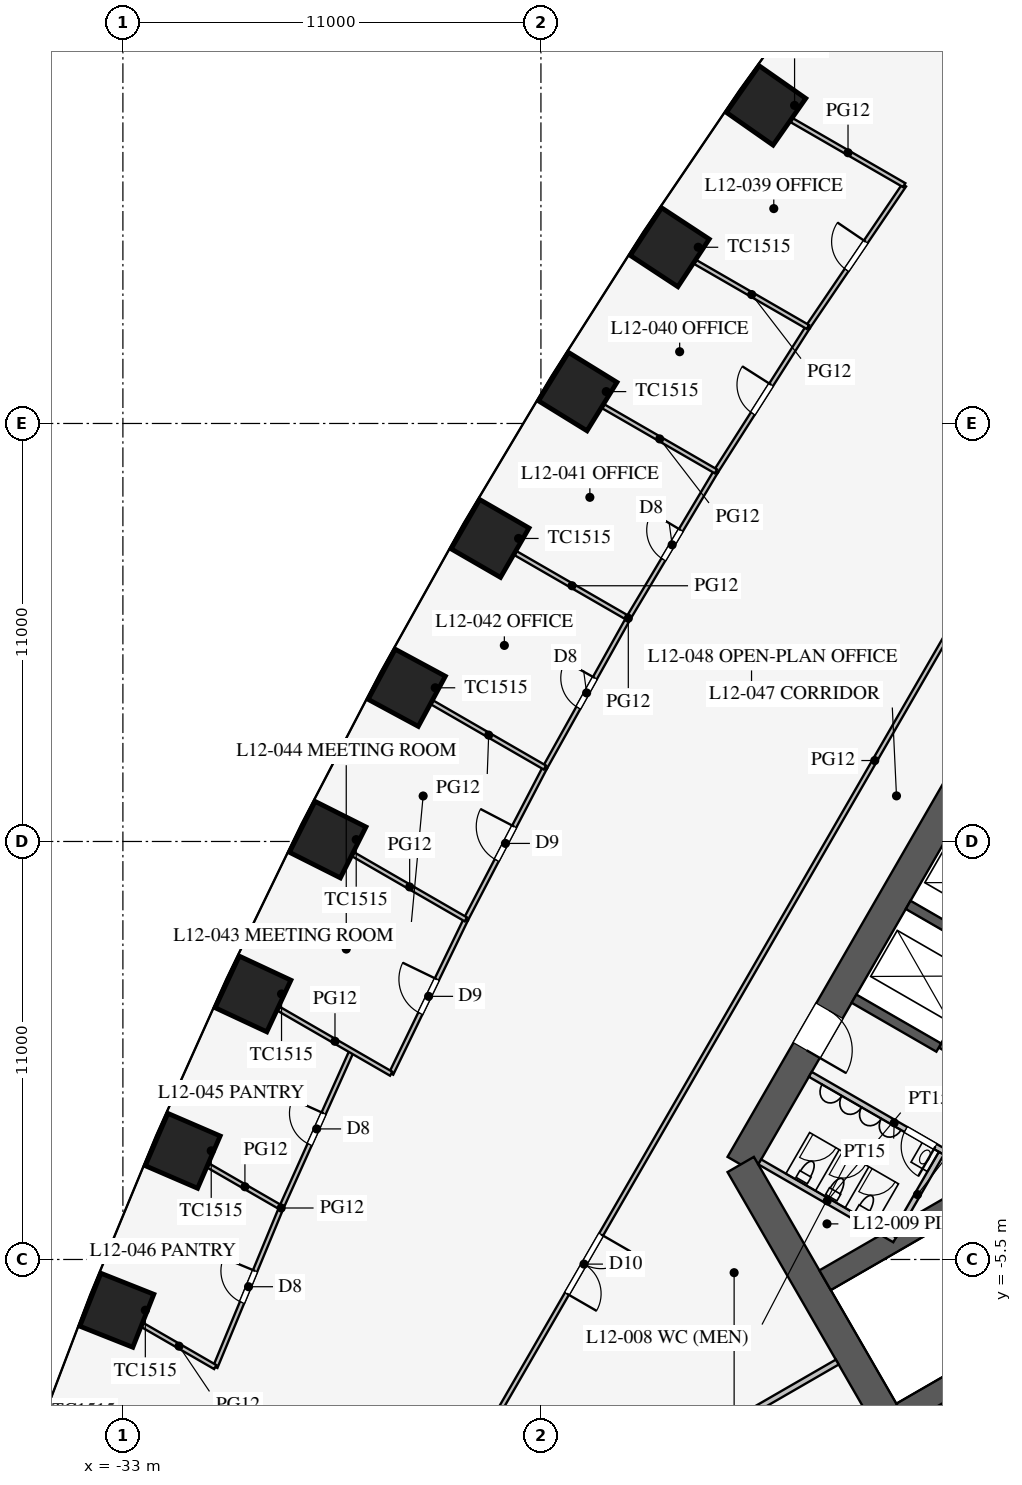
"""IFC4 building model, lengths in metres.
Left out: names, types, materials, properties, quantities, classifications, styles, units other than length and angle.
Written with IfcOpenShell. Run it as: python <this file> out.ifc"""

import sys

from ifc_helpers import new_model, si_unit, direction, frame, frame_2d, origin, origin_2d, place, context, subcontext, project, spatial, rectangle, extrude, element, fill, save


model = new_model("IFC4")
c1 = context("Model", 3, precision=1e-05, world=origin(), true_north=direction((0.0, 1.0)))
c2 = subcontext(c1, "Body", "Model", "MODEL_VIEW")
j1 = project(units=[si_unit("LENGTHUNIT", "METRE"), si_unit("PLANEANGLEUNIT", "RADIAN")], contexts=[c1])
p1 = place(None, origin())
s1 = spatial("IfcSite", under=j1, at=p1, CompositionType="ELEMENT")
p2 = place(p1, origin())
s2 = spatial("IfcBuilding", under=s1, at=p2, CompositionType="ELEMENT")
p3 = place(p2, frame((0.0, 0.0, 54.3)))
s3 = spatial("IfcBuildingStorey", under=s2, at=p3, CompositionType="ELEMENT", Elevation=54.3)
for number, where, z_axis, x_axis in (
    (1, (-16.076, 24.87, 0.0), (0.0, 0.0, 1.0), (-0.574, -0.819, 0.0)),
    (2, (-18.611, 21.137, 0.0), (0.0, 0.0, 1.0), (-0.549, -0.836, 0.0)),
    (3, (-21.031, 17.339, 0.0), (0.0, 0.0, 1.0), (-0.525, -0.851, 0.0)),
    (4, (-23.338, 13.474, 0.0), (0.0, 0.0, 1.0), (-0.5, -0.866, 0.0)),
    (5, (-25.531, 9.544, 0.0), (0.0, 0.0, 1.0), (-0.475, -0.88, 0.0)),
    (6, (-27.611, 5.549, 0.0), (0.0, 0.0, 1.0), (-0.449, -0.894, 0.0)),
    (7, (-29.576, 1.487, 0.0), (0.0, 0.0, 1.0), (-0.423, -0.906, 0.0)),
    (8, (-31.426, -2.641, 0.0), (0.0, 0.0, 1.0), (-0.396, -0.918, 0.0)),
    (9, (-33.16, -6.836, 0.0), (0.0, 0.0, 1.0), (-0.369, -0.929, 0.0)),
):
    element("IfcColumn", number, at=place(p3, frame(where, z_axis=z_axis, x_axis=x_axis)), inside=s3, PredefinedType="COLUMN", context=c2, shape_type="SweptSolid", body=[
        extrude(rectangle(XDim=1.5, YDim=1.5, at=origin_2d()), origin(), (0.0, 0.0, 1.0), 4.2),
    ])
p4 = place(p3, frame((-5.773, 16.0, 0.0), z_axis=(0.0, 0.0, 1.0), x_axis=(-0.500002442456, -0.866023993627, 0.0)))
e10 = element("IfcWall", 10, at=p4, inside=s3, PredefinedType="SHEAR", context=c2, shape_type="SweptSolid", body=[
    extrude(rectangle(XDim=21.939, YDim=0.8, at=frame_2d((10.97, 0.0))), origin(), (0.0, 0.0, 1.0), 4.2),
])
p5 = place(p4, frame((17.27, 0.0, 0.0)))
e11 = element("IfcOpeningElement", 11, at=p5, cuts=e10, PredefinedType="OPENING", context=c2, shape_type="SweptSolid", body=[
    extrude(rectangle(XDim=1.2, YDim=2.1, at=frame_2d((0.6, 1.05))), frame((0.0, 0.41, 0.0), z_axis=(0.0, -1.0, 0.0), x_axis=(1.0, 0.0, 0.0)), (0.0, 0.0, 1.0), 0.82),
])
p6 = place(p4, frame((3.47, 0.0, 0.0)))
e12 = element("IfcOpeningElement", 12, at=p6, cuts=e10, PredefinedType="OPENING", context=c2, shape_type="SweptSolid", body=[
    extrude(rectangle(XDim=1.2, YDim=2.1, at=frame_2d((0.6, 1.05))), frame((0.0, 0.41, 0.0), z_axis=(0.0, -1.0, 0.0), x_axis=(1.0, 0.0, 0.0)), (0.0, 0.0, 1.0), 0.82),
])
p7 = place(p3, frame((-16.743, -3.0, 0.0), z_axis=(0.0, 0.0, 1.0), x_axis=(0.499995765644, -0.866027848477, 0.0)))
e13 = element("IfcWall", 13, at=p7, inside=s3, PredefinedType="SHEAR", context=c2, shape_type="SweptSolid", body=[
    extrude(rectangle(XDim=11.547, YDim=0.8, at=frame_2d((5.773, 0.0))), origin(), (0.0, 0.0, 1.0), 4.2),
])
p8 = place(p3, frame((-5.724, 9.886, 0.0), z_axis=(0.0, 0.0, 1.0), x_axis=(-0.500001763848, -0.866024385424, 0.0)))
e14 = element("IfcWall", 14, at=p8, inside=s3, PredefinedType="SHEAR", context=c2, shape_type="SweptSolid", body=[
    extrude(rectangle(XDim=11.4, YDim=0.25, at=frame_2d((5.7, 0.0))), origin(), (0.0, 0.0, 1.0), 4.2),
])
p9 = place(p8, frame((6.525, 0.0, 0.0)))
e15 = element("IfcOpeningElement", 15, at=p9, cuts=e14, PredefinedType="OPENING", context=c2, shape_type="SweptSolid", body=[
    extrude(rectangle(XDim=1.2, YDim=2.2, at=frame_2d((0.6, 1.1))), frame((0.0, 0.135, 0.0), z_axis=(0.0, -1.0, 0.0), x_axis=(1.0, 0.0, 0.0)), (0.0, 0.0, 1.0), 0.27),
])
p10 = place(p8, frame((9.375, 0.0, 0.0)))
e16 = element("IfcOpeningElement", 16, at=p10, cuts=e14, PredefinedType="OPENING", context=c2, shape_type="SweptSolid", body=[
    extrude(rectangle(XDim=1.2, YDim=2.2, at=frame_2d((0.6, 1.1))), frame((0.0, 0.135, 0.0), z_axis=(0.0, -1.0, 0.0), x_axis=(1.0, 0.0, 0.0)), (0.0, 0.0, 1.0), 0.27),
])
for number, where, z_axis, x_axis in (
    (17, (-10.107, 2.544, 0.0), (0.0, 0.0, 1.0), (-0.866, 0.5, 0.0)),
    (18, (-11.532, 0.076, 0.0), (0.0, 0.0, 1.0), (-0.866, 0.5, 0.0)),
):
    element("IfcWall", number, at=place(p3, frame(where, z_axis=z_axis, x_axis=x_axis)), inside=s3, PredefinedType="SHEAR", context=c2, shape_type="SweptSolid", body=[
        extrude(rectangle(XDim=2.575, YDim=0.25, at=frame_2d((1.288, 0.0))), origin(), (0.0, 0.0, 1.0), 4.2),
    ])
for number, where, z_axis, x_axis in (
    (19, (-6.663, -1.509, 0.0), (0.0, 0.0, 1.0), (-0.866, -0.5, 0.0)),
    (20, (-4.638, -5.016, 0.0), (0.0, 0.0, 1.0), (-0.866, -0.5, 0.0)),
):
    element("IfcWall", number, at=place(p3, frame(where, z_axis=z_axis, x_axis=x_axis)), inside=s3, PredefinedType="SHEAR", context=c2, shape_type="SweptSolid", body=[
        extrude(rectangle(XDim=9.075, YDim=0.6, at=frame_2d((4.538, 0.0))), origin(), (0.0, 0.0, 1.0), 4.2),
    ])
p11 = place(p3, frame((-10.495, -3.178, 0.0), z_axis=(0.0, 0.0, 1.0), x_axis=(-0.86602216432, 0.500005610874, 0.0)))
e21 = element("IfcWall", 21, at=p11, inside=s3, PredefinedType="PARTITIONING", context=c2, shape_type="SweptSolid", body=[
    extrude(rectangle(XDim=5.1, YDim=0.15, at=frame_2d((2.55, 0.0))), origin(), (0.0, 0.0, 1.0), 4.0),
])
p12 = place(p11, frame((1.3, 0.0, 0.0)))
e22 = element("IfcOpeningElement", 22, at=p12, cuts=e21, PredefinedType="OPENING", context=c2, shape_type="SweptSolid", body=[
    extrude(rectangle(XDim=0.9, YDim=2.1, at=frame_2d((0.45, 1.05))), frame((0.0, 0.085, 0.0), z_axis=(0.0, -1.0, 0.0), x_axis=(1.0, 0.0, 0.0)), (0.0, 0.0, 1.0), 0.17),
])
p13 = place(p3, frame((-12.691, -4.982, 0.0), z_axis=(0.0, 0.0, 1.0), x_axis=(-0.8660249478, 0.500000789788, 0.0)))
e23 = element("IfcWall", 23, at=p13, inside=s3, PredefinedType="PARTITIONING", context=c2, shape_type="SweptSolid", body=[
    extrude(rectangle(XDim=4.1, YDim=0.15, at=frame_2d((2.05, 0.0))), origin(), (0.0, 0.0, 1.0), 4.0),
])
p14 = place(p3, frame((-11.464, -2.706, 0.0), z_axis=(0.0, 0.0, 1.0), x_axis=(-0.50001992892, -0.866013897511, 0.0)))
e24 = element("IfcWall", 24, at=p14, inside=s3, PredefinedType="PARTITIONING", context=c2, shape_type="SweptSolid", body=[
    extrude(rectangle(XDim=2.51, YDim=0.15, at=frame_2d((1.255, 0.0))), origin(), (0.0, 0.0, 1.0), 4.0),
])
p15 = place(p3, frame((-14.203, -8.2, 0.0), z_axis=(0.0, 0.0, 1.0), x_axis=(-0.866024965723, -0.500000758745, 0.0)))
e25 = element("IfcWall", 25, at=p15, inside=s3, PredefinedType="PARTITIONING", context=c2, shape_type="SweptSolid", body=[
    extrude(rectangle(XDim=18.25, YDim=0.15, at=frame_2d((9.125, 0.0))), origin(), (0.0, 0.0, 1.0), 2.3),
])
p16 = place(p3, frame((-0.016, 30.491, 0.0), z_axis=(0.0, 0.0, 1.0), x_axis=(-0.50000091641, -0.866024874695, 0.0)))
e26 = element("IfcWall", 26, at=p16, inside=s3, PredefinedType="PARTITIONING", context=c2, shape_type="SweptSolid", body=[
    extrude(rectangle(XDim=52.796, YDim=0.12, at=frame_2d((26.398, 0.0))), origin(), (0.0, 0.0, 1.0), 2.9),
])
p17 = place(p16, frame((10.2, 0.0, 0.15)))
e27 = element("IfcOpeningElement", 27, at=p17, cuts=e26, PredefinedType="OPENING", context=c2, shape_type="SweptSolid", body=[
    extrude(rectangle(XDim=1.8, YDim=2.1, at=frame_2d((0.9, 1.05))), frame((0.0, 0.07, 0.0), z_axis=(0.0, -1.0, 0.0), x_axis=(1.0, 0.0, 0.0)), (0.0, 0.0, 1.0), 0.14),
])
p18 = place(p16, frame((40.8, 0.0, 0.15)))
e28 = element("IfcOpeningElement", 28, at=p18, cuts=e26, PredefinedType="OPENING", context=c2, shape_type="SweptSolid", body=[
    extrude(rectangle(XDim=1.8, YDim=2.1, at=frame_2d((0.9, 1.05))), frame((0.0, 0.07, 0.0), z_axis=(0.0, -1.0, 0.0), x_axis=(1.0, 0.0, 0.0)), (0.0, 0.0, 1.0), 0.14),
])
p19 = place(p3, frame((-19.701, 11.374, 0.0), z_axis=(0.0, 0.0, 1.0), x_axis=(-0.487415216275, -0.87317031955, 0.0)))
e29 = element("IfcWall", 29, at=p19, inside=s3, PredefinedType="PARTITIONING", context=c2, shape_type="SweptSolid", body=[
    extrude(rectangle(XDim=4.5, YDim=0.12, at=frame_2d((2.25, 0.0))), origin(), (0.0, 0.0, 1.0), 2.9),
])
p20 = place(p19, frame((1.8, 0.0, 0.15)))
e30 = element("IfcOpeningElement", 30, at=p20, cuts=e29, PredefinedType="OPENING", context=c2, shape_type="SweptSolid", body=[
    extrude(rectangle(XDim=0.9, YDim=2.1, at=frame_2d((0.45, 1.05))), frame((0.0, 0.07, 0.0), z_axis=(0.0, -1.0, 0.0), x_axis=(1.0, 0.0, 0.0)), (0.0, 0.0, 1.0), 0.14),
])
p21 = place(p3, frame((-26.98, -0.011, 0.0), z_axis=(0.0, 0.0, 1.0), x_axis=(-0.409430894151, -0.912341132973, 0.0)))
e31 = element("IfcWall", 31, at=p21, inside=s3, PredefinedType="PARTITIONING", context=c2, shape_type="SweptSolid", body=[
    extrude(rectangle(XDim=4.523, YDim=0.12, at=frame_2d((2.262, 0.0))), origin(), (0.0, 0.0, 1.0), 2.9),
])
p22 = place(p21, frame((1.8, 0.0, 0.15)))
e32 = element("IfcOpeningElement", 32, at=p22, cuts=e31, PredefinedType="OPENING", context=c2, shape_type="SweptSolid", body=[
    extrude(rectangle(XDim=0.9, YDim=2.1, at=frame_2d((0.45, 1.05))), frame((0.0, 0.07, 0.0), z_axis=(0.0, -1.0, 0.0), x_axis=(1.0, 0.0, 0.0)), (0.0, 0.0, 1.0), 0.14),
])
p23 = place(p3, frame((-28.833, -4.138, 0.0), z_axis=(0.0, 0.0, 1.0), x_axis=(-0.38265900014, -0.923889652292, 0.0)))
e33 = element("IfcWall", 33, at=p23, inside=s3, PredefinedType="PARTITIONING", context=c2, shape_type="SweptSolid", body=[
    extrude(rectangle(XDim=4.539, YDim=0.12, at=frame_2d((2.27, 0.0))), origin(), (0.0, 0.0, 1.0), 2.9),
])
p24 = place(p23, frame((1.8, 0.0, 0.15)))
e34 = element("IfcOpeningElement", 34, at=p24, cuts=e33, PredefinedType="OPENING", context=c2, shape_type="SweptSolid", body=[
    extrude(rectangle(XDim=0.9, YDim=2.1, at=frame_2d((0.45, 1.05))), frame((0.0, 0.07, 0.0), z_axis=(0.0, -1.0, 0.0), x_axis=(1.0, 0.0, 0.0)), (0.0, 0.0, 1.0), 0.14),
])
p25 = place(p3, frame((-21.895, 7.445, 0.0), z_axis=(0.0, 0.0, 1.0), x_axis=(-0.461810056307, -0.886978845235, 0.0)))
e35 = element("IfcWall", 35, at=p25, inside=s3, PredefinedType="PARTITIONING", context=c2, shape_type="SweptSolid", body=[
    extrude(rectangle(XDim=4.504, YDim=0.12, at=frame_2d((2.252, 0.0))), origin(), (0.0, 0.0, 1.0), 2.9),
])
p26 = place(p25, frame((1.75, 0.0, 0.15)))
e36 = element("IfcOpeningElement", 36, at=p26, cuts=e35, PredefinedType="OPENING", context=c2, shape_type="SweptSolid", body=[
    extrude(rectangle(XDim=1.0, YDim=2.1, at=frame_2d((0.5, 1.05))), frame((0.0, 0.07, 0.0), z_axis=(0.0, -1.0, 0.0), x_axis=(1.0, 0.0, 0.0)), (0.0, 0.0, 1.0), 0.14),
])
p27 = place(p3, frame((-23.975, 3.449, 0.0), z_axis=(0.0, 0.0, 1.0), x_axis=(-0.435857917556, -0.900015486369, 0.0)))
e37 = element("IfcWall", 37, at=p27, inside=s3, PredefinedType="PARTITIONING", context=c2, shape_type="SweptSolid", body=[
    extrude(rectangle(XDim=4.512, YDim=0.12, at=frame_2d((2.256, 0.0))), origin(), (0.0, 0.0, 1.0), 2.9),
])
p28 = place(p27, frame((1.75, 0.0, 0.15)))
e38 = element("IfcOpeningElement", 38, at=p28, cuts=e37, PredefinedType="OPENING", context=c2, shape_type="SweptSolid", body=[
    extrude(rectangle(XDim=1.0, YDim=2.1, at=frame_2d((0.5, 1.05))), frame((0.0, 0.07, 0.0), z_axis=(0.0, -1.0, 0.0), x_axis=(1.0, 0.0, 0.0)), (0.0, 0.0, 1.0), 0.14),
])
p29 = place(p3, frame((-12.441, 22.771, 0.0), z_axis=(0.0, 0.0, 1.0), x_axis=(-0.561512004239, -0.827468591002, 0.0)))
e39 = element("IfcWall", 39, at=p29, inside=s3, PredefinedType="PARTITIONING", context=c2, shape_type="SweptSolid", body=[
    extrude(rectangle(XDim=4.512, YDim=0.12, at=frame_2d((2.256, 0.0))), origin(), (0.0, 0.0, 1.0), 2.9),
])
p30 = place(p29, frame((1.8, 0.0, 0.15)))
e40 = element("IfcOpeningElement", 40, at=p30, cuts=e39, PredefinedType="OPENING", context=c2, shape_type="SweptSolid", body=[
    extrude(rectangle(XDim=0.9, YDim=2.1, at=frame_2d((0.45, 1.05))), frame((0.0, 0.07, 0.0), z_axis=(0.0, -1.0, 0.0), x_axis=(1.0, 0.0, 0.0)), (0.0, 0.0, 1.0), 0.14),
])
p31 = place(p3, frame((-17.395, 15.239, 0.0), z_axis=(0.0, 0.0, 1.0), x_axis=(-0.512483962191, -0.858696796604, 0.0)))
e41 = element("IfcWall", 41, at=p31, inside=s3, PredefinedType="PARTITIONING", context=c2, shape_type="SweptSolid", body=[
    extrude(rectangle(XDim=4.5, YDim=0.12, at=frame_2d((2.25, 0.0))), origin(), (0.0, 0.0, 1.0), 2.9),
])
p32 = place(p31, frame((1.8, 0.0, 0.15)))
e42 = element("IfcOpeningElement", 42, at=p32, cuts=e41, PredefinedType="OPENING", context=c2, shape_type="SweptSolid", body=[
    extrude(rectangle(XDim=0.9, YDim=2.1, at=frame_2d((0.45, 1.05))), frame((0.0, 0.07, 0.0), z_axis=(0.0, -1.0, 0.0), x_axis=(1.0, 0.0, 0.0)), (0.0, 0.0, 1.0), 0.14),
])
p33 = place(p3, frame((-14.975, 19.038, 0.0), z_axis=(0.0, 0.0, 1.0), x_axis=(-0.537243691336, -0.843427066272, 0.0)))
e43 = element("IfcWall", 43, at=p33, inside=s3, PredefinedType="PARTITIONING", context=c2, shape_type="SweptSolid", body=[
    extrude(rectangle(XDim=4.504, YDim=0.12, at=frame_2d((2.252, 0.0))), origin(), (0.0, 0.0, 1.0), 2.9),
])
p34 = place(p33, frame((1.8, 0.0, 0.15)))
e44 = element("IfcOpeningElement", 44, at=p34, cuts=e43, PredefinedType="OPENING", context=c2, shape_type="SweptSolid", body=[
    extrude(rectangle(XDim=0.9, YDim=2.1, at=frame_2d((0.45, 1.05))), frame((0.0, 0.07, 0.0), z_axis=(0.0, -1.0, 0.0), x_axis=(1.0, 0.0, 0.0)), (0.0, 0.0, 1.0), 0.14),
])
p35 = place(p3, frame((-19.701, 11.374, 0.0), z_axis=(0.0, 0.0, 1.0), x_axis=(-0.866007273829, 0.50003140069, 0.0)))
e45 = element("IfcWall", 45, at=p35, inside=s3, PredefinedType="PARTITIONING", context=c2, shape_type="SweptSolid", body=[
    extrude(rectangle(XDim=3.42, YDim=0.12, at=frame_2d((1.71, 0.0))), origin(), (0.0, 0.0, 1.0), 2.9),
])
p36 = place(p3, frame((-25.941, -0.611, 0.0), z_axis=(0.0, 0.0, 1.0), x_axis=(-0.866016478054, 0.500015459501, 0.0)))
e46 = element("IfcWall", 46, at=p36, inside=s3, PredefinedType="PARTITIONING", context=c2, shape_type="SweptSolid", body=[
    extrude(rectangle(XDim=3.414, YDim=0.12, at=frame_2d((1.707, 0.0))), origin(), (0.0, 0.0, 1.0), 2.9),
])
p37 = place(p3, frame((-28.833, -4.138, 0.0), z_axis=(0.0, 0.0, 1.0), x_axis=(-0.866010764432, 0.500025355245, 0.0)))
e47 = element("IfcWall", 47, at=p37, inside=s3, PredefinedType="PARTITIONING", context=c2, shape_type="SweptSolid", body=[
    extrude(rectangle(XDim=2.209, YDim=0.12, at=frame_2d((1.105, 0.0))), origin(), (0.0, 0.0, 1.0), 2.9),
])
p38 = place(p3, frame((-30.569, -8.332, 0.0), z_axis=(0.0, 0.0, 1.0), x_axis=(-0.86602503688, 0.500000635496, 0.0)))
e48 = element("IfcWall", 48, at=p38, inside=s3, PredefinedType="PARTITIONING", context=c2, shape_type="SweptSolid", body=[
    extrude(rectangle(XDim=2.203, YDim=0.12, at=frame_2d((1.102, 0.0))), origin(), (0.0, 0.0, 1.0), 2.9),
])
p39 = place(p3, frame((-21.895, 7.445, 0.0), z_axis=(0.0, 0.0, 1.0), x_axis=(-0.866015553834, 0.500017060227, 0.0)))
e49 = element("IfcWall", 49, at=p39, inside=s3, PredefinedType="PARTITIONING", context=c2, shape_type="SweptSolid", body=[
    extrude(rectangle(XDim=3.419, YDim=0.12, at=frame_2d((1.71, 0.0))), origin(), (0.0, 0.0, 1.0), 2.9),
])
p40 = place(p3, frame((-23.975, 3.449, 0.0), z_axis=(0.0, 0.0, 1.0), x_axis=(-0.866014265796, 0.500019291066, 0.0)))
e50 = element("IfcWall", 50, at=p40, inside=s3, PredefinedType="PARTITIONING", context=c2, shape_type="SweptSolid", body=[
    extrude(rectangle(XDim=3.417, YDim=0.12, at=frame_2d((1.708, 0.0))), origin(), (0.0, 0.0, 1.0), 2.9),
])
p41 = place(p3, frame((-12.441, 22.771, 0.0), z_axis=(0.0, 0.0, 1.0), x_axis=(-0.866016478054, 0.500015459501, 0.0)))
e51 = element("IfcWall", 51, at=p41, inside=s3, PredefinedType="PARTITIONING", context=c2, shape_type="SweptSolid", body=[
    extrude(rectangle(XDim=3.414, YDim=0.12, at=frame_2d((1.707, 0.0))), origin(), (0.0, 0.0, 1.0), 2.9),
])
p42 = place(p3, frame((-17.395, 15.239, 0.0), z_axis=(0.0, 0.0, 1.0), x_axis=(-0.866015553834, 0.500017060227, 0.0)))
e52 = element("IfcWall", 52, at=p42, inside=s3, PredefinedType="PARTITIONING", context=c2, shape_type="SweptSolid", body=[
    extrude(rectangle(XDim=3.419, YDim=0.12, at=frame_2d((1.71, 0.0))), origin(), (0.0, 0.0, 1.0), 2.9),
])
p43 = place(p3, frame((-14.975, 19.038, 0.0), z_axis=(0.0, 0.0, 1.0), x_axis=(-0.866014265796, 0.500019291066, 0.0)))
e53 = element("IfcWall", 53, at=p43, inside=s3, PredefinedType="PARTITIONING", context=c2, shape_type="SweptSolid", body=[
    extrude(rectangle(XDim=3.417, YDim=0.12, at=frame_2d((1.708, 0.0))), origin(), (0.0, 0.0, 1.0), 2.9),
])
p44 = place(p12, origin())
e54 = element("IfcDoor", 54, at=p44, inside=s3, OperationType="SINGLE_SWING_LEFT", PredefinedType="DOOR", context=c2, shape_type="SweptSolid", body=[
    extrude(rectangle(XDim=0.9, YDim=2.1, at=frame_2d((0.45, 1.05))), frame((0.0, 0.025, 0.0), z_axis=(0.0, -1.0, 0.0), x_axis=(1.0, 0.0, 0.0)), (0.0, 0.0, 1.0), 0.05),
])
fill(e22, e54)
p45 = place(p5, origin())
e55 = element("IfcDoor", 55, at=p45, inside=s3, OperationType="SINGLE_SWING_RIGHT", PredefinedType="DOOR", context=c2, shape_type="SweptSolid", body=[
    extrude(rectangle(XDim=1.2, YDim=2.1, at=frame_2d((0.6, 1.05))), frame((0.0, 0.025, 0.0), z_axis=(0.0, -1.0, 0.0), x_axis=(1.0, 0.0, 0.0)), (0.0, 0.0, 1.0), 0.05),
])
fill(e11, e55)
p46 = place(p30, frame((0.9, 0.0, 0.0), z_axis=(0.0, 0.0, 1.0), x_axis=(-1.0, 0.0, 0.0)))
e56 = element("IfcDoor", 56, at=p46, inside=s3, OperationType="SINGLE_SWING_RIGHT", PredefinedType="DOOR", context=c2, shape_type="SweptSolid", body=[
    extrude(rectangle(XDim=0.9, YDim=2.1, at=frame_2d((0.45, 1.05))), frame((0.0, 0.025, 0.0), z_axis=(0.0, -1.0, 0.0), x_axis=(1.0, 0.0, 0.0)), (0.0, 0.0, 1.0), 0.05),
])
fill(e40, e56)
p47 = place(p34, frame((0.9, 0.0, 0.0), z_axis=(0.0, 0.0, 1.0), x_axis=(-1.0, 0.0, 0.0)))
e57 = element("IfcDoor", 57, at=p47, inside=s3, OperationType="SINGLE_SWING_RIGHT", PredefinedType="DOOR", context=c2, shape_type="SweptSolid", body=[
    extrude(rectangle(XDim=0.9, YDim=2.1, at=frame_2d((0.45, 1.05))), frame((0.0, 0.025, 0.0), z_axis=(0.0, -1.0, 0.0), x_axis=(1.0, 0.0, 0.0)), (0.0, 0.0, 1.0), 0.05),
])
fill(e44, e57)
p48 = place(p32, frame((0.9, 0.0, 0.0), z_axis=(0.0, 0.0, 1.0), x_axis=(-1.0, 0.0, 0.0)))
e58 = element("IfcDoor", 58, at=p48, inside=s3, OperationType="SINGLE_SWING_RIGHT", PredefinedType="DOOR", context=c2, shape_type="SweptSolid", body=[
    extrude(rectangle(XDim=0.9, YDim=2.1, at=frame_2d((0.45, 1.05))), frame((0.0, 0.025, 0.0), z_axis=(0.0, -1.0, 0.0), x_axis=(1.0, 0.0, 0.0)), (0.0, 0.0, 1.0), 0.05),
])
fill(e42, e58)
p49 = place(p20, frame((0.9, 0.0, 0.0), z_axis=(0.0, 0.0, 1.0), x_axis=(-1.0, 0.0, 0.0)))
e59 = element("IfcDoor", 59, at=p49, inside=s3, OperationType="SINGLE_SWING_RIGHT", PredefinedType="DOOR", context=c2, shape_type="SweptSolid", body=[
    extrude(rectangle(XDim=0.9, YDim=2.1, at=frame_2d((0.45, 1.05))), frame((0.0, 0.025, 0.0), z_axis=(0.0, -1.0, 0.0), x_axis=(1.0, 0.0, 0.0)), (0.0, 0.0, 1.0), 0.05),
])
fill(e30, e59)
p50 = place(p26, frame((1.0, 0.0, 0.0), z_axis=(0.0, 0.0, 1.0), x_axis=(-1.0, 0.0, 0.0)))
e60 = element("IfcDoor", 60, at=p50, inside=s3, OperationType="SINGLE_SWING_RIGHT", PredefinedType="DOOR", context=c2, shape_type="SweptSolid", body=[
    extrude(rectangle(XDim=1.0, YDim=2.1, at=frame_2d((0.5, 1.05))), frame((0.0, 0.025, 0.0), z_axis=(0.0, -1.0, 0.0), x_axis=(1.0, 0.0, 0.0)), (0.0, 0.0, 1.0), 0.05),
])
fill(e36, e60)
p51 = place(p28, frame((1.0, 0.0, 0.0), z_axis=(0.0, 0.0, 1.0), x_axis=(-1.0, 0.0, 0.0)))
e61 = element("IfcDoor", 61, at=p51, inside=s3, OperationType="SINGLE_SWING_RIGHT", PredefinedType="DOOR", context=c2, shape_type="SweptSolid", body=[
    extrude(rectangle(XDim=1.0, YDim=2.1, at=frame_2d((0.5, 1.05))), frame((0.0, 0.025, 0.0), z_axis=(0.0, -1.0, 0.0), x_axis=(1.0, 0.0, 0.0)), (0.0, 0.0, 1.0), 0.05),
])
fill(e38, e61)
p52 = place(p22, frame((0.9, 0.0, 0.0), z_axis=(0.0, 0.0, 1.0), x_axis=(-1.0, 0.0, 0.0)))
e62 = element("IfcDoor", 62, at=p52, inside=s3, OperationType="SINGLE_SWING_RIGHT", PredefinedType="DOOR", context=c2, shape_type="SweptSolid", body=[
    extrude(rectangle(XDim=0.9, YDim=2.1, at=frame_2d((0.45, 1.05))), frame((0.0, 0.025, 0.0), z_axis=(0.0, -1.0, 0.0), x_axis=(1.0, 0.0, 0.0)), (0.0, 0.0, 1.0), 0.05),
])
fill(e32, e62)
p53 = place(p24, frame((0.9, 0.0, 0.0), z_axis=(0.0, 0.0, 1.0), x_axis=(-1.0, 0.0, 0.0)))
e63 = element("IfcDoor", 63, at=p53, inside=s3, OperationType="SINGLE_SWING_RIGHT", PredefinedType="DOOR", context=c2, shape_type="SweptSolid", body=[
    extrude(rectangle(XDim=0.9, YDim=2.1, at=frame_2d((0.45, 1.05))), frame((0.0, 0.025, 0.0), z_axis=(0.0, -1.0, 0.0), x_axis=(1.0, 0.0, 0.0)), (0.0, 0.0, 1.0), 0.05),
])
fill(e34, e63)
p54 = place(p18, origin())
e64 = element("IfcDoor", 64, at=p54, inside=s3, OperationType="DOUBLE_DOOR_SINGLE_SWING", PredefinedType="DOOR", context=c2, shape_type="SweptSolid", body=[
    extrude(rectangle(XDim=1.8, YDim=2.1, at=frame_2d((0.9, 1.05))), frame((0.0, 0.025, 0.0), z_axis=(0.0, -1.0, 0.0), x_axis=(1.0, 0.0, 0.0)), (0.0, 0.0, 1.0), 0.05),
])
fill(e28, e64)
save(model, sys.argv[1])
